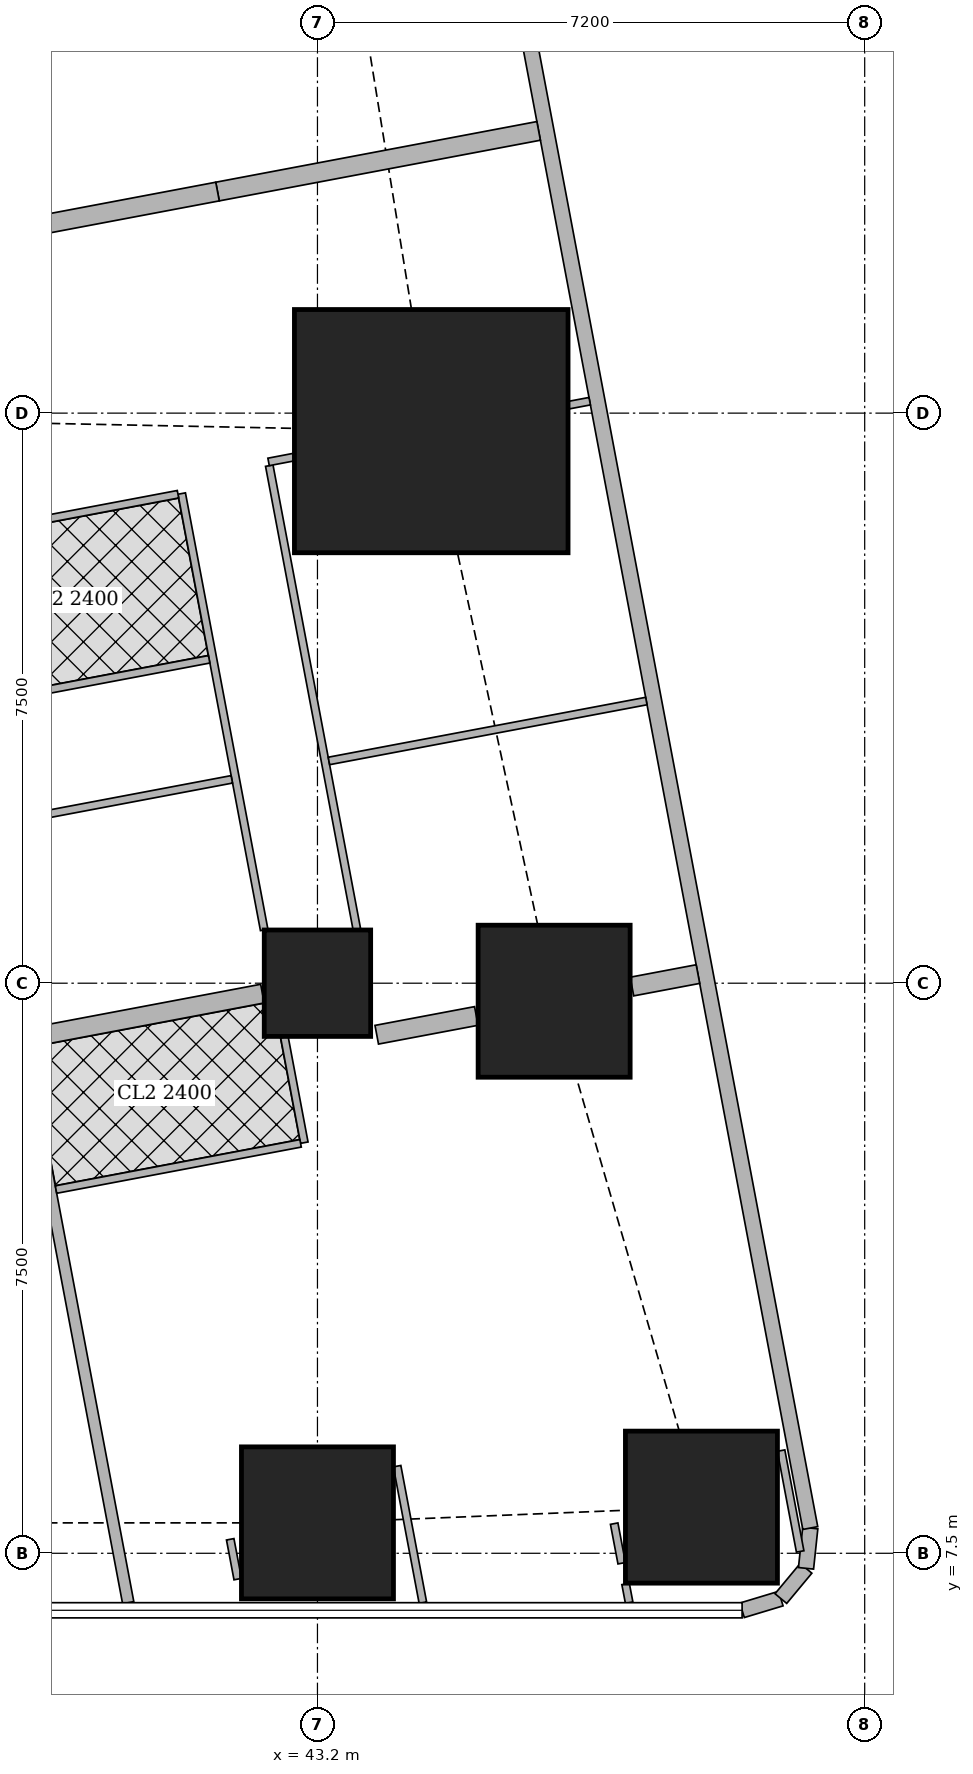
"""IFC4 building model, lengths in metres.
Left out: names, types, materials, properties, quantities, classifications, styles, units other than length and angle.
Written with IfcOpenShell. Run it as: python <this file> out.ifc"""

import sys

from ifc_helpers import new_model, si_unit, direction, frame, frame_2d, origin, origin_2d, place, context, subcontext, project, spatial, rectangle, extrude, element, fill, save


model = new_model("IFC4")
c1 = context("Model", 3, precision=1e-05, world=origin(), true_north=direction((0.0, 1.0)))
c2 = subcontext(c1, "Body", "Model", "MODEL_VIEW")
j1 = project(units=[si_unit("LENGTHUNIT", "METRE"), si_unit("PLANEANGLEUNIT", "RADIAN")], contexts=[c1])
p1 = place(None, origin())
s1 = spatial("IfcSite", under=j1, at=p1, CompositionType="ELEMENT")
p2 = place(p1, origin())
s2 = spatial("IfcBuilding", under=s1, at=p2, CompositionType="ELEMENT")
p3 = place(p2, frame((0.0, 0.0, 262.85)))
s3 = spatial("IfcBuildingStorey", under=s2, at=p3, CompositionType="ELEMENT", Elevation=262.85)
for number, where, z_axis, x_axis in (
    (1, (43.2, 7.9, 0.0), (0.0, 0.0, 1.0), (1.0, 0.0, 0.0)),
    (2, (48.252, 8.107, 0.0), (0.0, 0.0, 1.0), (1.0, 0.0, 0.0)),
):
    element("IfcColumn", number, at=place(p3, frame(where, z_axis=z_axis, x_axis=x_axis)), inside=s3, PredefinedType="COLUMN", context=c2, shape_type="SweptSolid", body=[
        extrude(rectangle(XDim=2.0, YDim=2.0, at=origin_2d()), origin(), (0.0, 0.0, 1.0), 3.75),
    ])
p4 = place(p3, frame((43.2, 15.0, 0.0), z_axis=(0.0, 0.0, 1.0), x_axis=(1.0, 0.0, 0.0)))
e3 = element("IfcColumn", 3, at=p4, inside=s3, PredefinedType="COLUMN", context=c2, shape_type="SweptSolid", body=[
    extrude(rectangle(XDim=1.4, YDim=1.4, at=origin_2d()), origin(), (0.0, 0.0, 1.0), 3.75),
])
p5 = place(p3, frame((46.314, 14.763, 0.0), z_axis=(0.0, 0.0, 1.0), x_axis=(1.0, 0.0, 0.0)))
e4 = element("IfcColumn", 4, at=p5, inside=s3, PredefinedType="COLUMN", context=c2, shape_type="SweptSolid", body=[
    extrude(rectangle(XDim=2.0, YDim=2.0, at=origin_2d()), origin(), (0.0, 0.0, 1.0), 3.75),
])
p6 = place(p3, frame((44.697, 22.263, 0.0), z_axis=(0.0, 0.0, 1.0), x_axis=(1.0, 0.0, 0.0)))
e5 = element("IfcColumn", 5, at=p6, inside=s3, PredefinedType="COLUMN", context=c2, shape_type="SweptSolid", body=[
    extrude(rectangle(XDim=3.6, YDim=3.2, at=origin_2d()), origin(), (0.0, 0.0, 1.0), 3.75),
])
p7 = place(p3, frame((48.787, 6.75, 0.0), z_axis=(0.0, 0.0, 1.0), x_axis=(0.957282247819, 0.289155145225, 0.0)))
e6 = element("IfcWall", 6, at=p7, inside=s3, PredefinedType="SOLIDWALL", context=c2, shape_type="SweptSolid", body=[
    extrude(rectangle(XDim=0.533, YDim=0.2, at=frame_2d((0.266, 0.0))), origin(), (0.0, 0.0, 1.0), 3.5),
])
p8 = place(p3, frame((49.297, 6.904, 0.0), z_axis=(0.0, 0.0, 1.0), x_axis=(0.639255849474, 0.768994121508, 0.0)))
e7 = element("IfcWall", 7, at=p8, inside=s3, PredefinedType="SOLIDWALL", context=c2, shape_type="SweptSolid", body=[
    extrude(rectangle(XDim=0.518, YDim=0.2, at=frame_2d((0.259, 0.0))), origin(), (0.0, 0.0, 1.0), 3.5),
])
p9 = place(p3, frame((49.628, 7.302, 0.0), z_axis=(0.0, 0.0, 1.0), x_axis=(0.105352390132, 0.994434952068, 0.0)))
e8 = element("IfcWall", 8, at=p9, inside=s3, PredefinedType="SOLIDWALL", context=c2, shape_type="SweptSolid", body=[
    extrude(rectangle(XDim=0.533, YDim=0.2, at=frame_2d((0.267, 0.0))), origin(), (0.0, 0.0, 1.0), 3.5),
])
p10 = place(p3, frame((49.684, 7.832, 0.0), z_axis=(0.0, 0.0, 1.0), x_axis=(-0.185616669694, 0.982622232565, 0.0)))
e9 = element("IfcWall", 9, at=p10, inside=s3, PredefinedType="SOLIDWALL", context=c2, shape_type="SweptSolid", body=[
    extrude(rectangle(XDim=36.0, YDim=0.2, at=frame_2d((18.0, 0.0))), origin(), (0.0, 0.0, 1.0), 3.5),
])
p11 = place(p10, frame((2.518, 0.0, 0.9)))
e10 = element("IfcOpeningElement", 10, at=p11, cuts=e9, PredefinedType="OPENING", context=c2, shape_type="SweptSolid", body=[
    extrude(rectangle(XDim=2.4, YDim=1.5, at=frame_2d((1.2, 0.75))), frame((0.0, 0.11, 0.0), z_axis=(0.0, -1.0, 0.0), x_axis=(1.0, 0.0, 0.0)), (0.0, 0.0, 1.0), 0.22),
])
p12 = place(p10, frame((8.444, 0.0, 0.9)))
e11 = element("IfcOpeningElement", 11, at=p12, cuts=e9, PredefinedType="OPENING", context=c2, shape_type="SweptSolid", body=[
    extrude(rectangle(XDim=1.8, YDim=1.5, at=frame_2d((0.9, 0.75))), frame((0.0, 0.11, 0.0), z_axis=(0.0, -1.0, 0.0), x_axis=(1.0, 0.0, 0.0)), (0.0, 0.0, 1.0), 0.22),
])
p13 = place(p10, frame((12.261, 0.0, 0.9)))
e12 = element("IfcOpeningElement", 12, at=p13, cuts=e9, PredefinedType="OPENING", context=c2, shape_type="SweptSolid", body=[
    extrude(rectangle(XDim=1.8, YDim=1.5, at=frame_2d((0.9, 0.75))), frame((0.0, 0.11, 0.0), z_axis=(0.0, -1.0, 0.0), x_axis=(1.0, 0.0, 0.0)), (0.0, 0.0, 1.0), 0.22),
])
p14 = place(p10, frame((16.078, 0.0, 0.9)))
e13 = element("IfcOpeningElement", 13, at=p14, cuts=e9, PredefinedType="OPENING", context=c2, shape_type="SweptSolid", body=[
    extrude(rectangle(XDim=1.8, YDim=1.5, at=frame_2d((0.9, 0.75))), frame((0.0, 0.11, 0.0), z_axis=(0.0, -1.0, 0.0), x_axis=(1.0, 0.0, 0.0)), (0.0, 0.0, 1.0), 0.22),
])
p15 = place(p10, frame((19.894, 0.0, 0.9)))
e14 = element("IfcOpeningElement", 14, at=p15, cuts=e9, PredefinedType="OPENING", context=c2, shape_type="SweptSolid", body=[
    extrude(rectangle(XDim=1.8, YDim=1.5, at=frame_2d((0.9, 0.75))), frame((0.0, 0.11, 0.0), z_axis=(0.0, -1.0, 0.0), x_axis=(1.0, 0.0, 0.0)), (0.0, 0.0, 1.0), 0.22),
])
p16 = place(p10, frame((23.71, 0.0, 0.9)))
e15 = element("IfcOpeningElement", 15, at=p16, cuts=e9, PredefinedType="OPENING", context=c2, shape_type="SweptSolid", body=[
    extrude(rectangle(XDim=1.8, YDim=1.5, at=frame_2d((0.9, 0.75))), frame((0.0, 0.11, 0.0), z_axis=(0.0, -1.0, 0.0), x_axis=(1.0, 0.0, 0.0)), (0.0, 0.0, 1.0), 0.22),
])
p17 = place(p10, frame((27.526, 0.0, 0.9)))
e16 = element("IfcOpeningElement", 16, at=p17, cuts=e9, PredefinedType="OPENING", context=c2, shape_type="SweptSolid", body=[
    extrude(rectangle(XDim=1.8, YDim=1.5, at=frame_2d((0.9, 0.75))), frame((0.0, 0.11, 0.0), z_axis=(0.0, -1.0, 0.0), x_axis=(1.0, 0.0, 0.0)), (0.0, 0.0, 1.0), 0.22),
])
p18 = place(p10, frame((32.046, 0.0, 0.9)))
e17 = element("IfcOpeningElement", 17, at=p18, cuts=e9, PredefinedType="OPENING", context=c2, shape_type="SweptSolid", body=[
    extrude(rectangle(XDim=1.8, YDim=1.5, at=frame_2d((0.9, 0.75))), frame((0.0, 0.11, 0.0), z_axis=(0.0, -1.0, 0.0), x_axis=(1.0, 0.0, 0.0)), (0.0, 0.0, 1.0), 0.22),
])
p19 = place(p3, frame((34.036, 42.186, 0.0), z_axis=(0.0, 0.0, 1.0), x_axis=(0.185593518645, -0.9826266055, 0.0)))
e18 = element("IfcWall", 18, at=p19, inside=s3, PredefinedType="SOLIDWALL", context=c2, shape_type="SweptSolid", body=[
    extrude(rectangle(XDim=35.961, YDim=0.15, at=frame_2d((17.98, 0.0))), origin(), (0.0, 0.0, 1.0), 2.5),
])
p20 = place(p19, frame((15.529, 0.0, 0.0)))
e19 = element("IfcOpeningElement", 19, at=p20, cuts=e18, PredefinedType="OPENING", context=c2, shape_type="SweptSolid", body=[
    extrude(rectangle(XDim=1.0, YDim=2.1, at=frame_2d((0.5, 1.05))), frame((0.0, 0.085, 0.0), z_axis=(0.0, -1.0, 0.0), x_axis=(1.0, 0.0, 0.0)), (0.0, 0.0, 1.0), 0.17),
])
p21 = place(p19, frame((19.345, 0.0, 0.0)))
e20 = element("IfcOpeningElement", 20, at=p21, cuts=e18, PredefinedType="OPENING", context=c2, shape_type="SweptSolid", body=[
    extrude(rectangle(XDim=1.0, YDim=2.1, at=frame_2d((0.5, 1.05))), frame((0.0, 0.085, 0.0), z_axis=(0.0, -1.0, 0.0), x_axis=(1.0, 0.0, 0.0)), (0.0, 0.0, 1.0), 0.17),
])
p22 = place(p19, frame((30.594, 0.0, 0.0)))
e21 = element("IfcOpeningElement", 21, at=p22, cuts=e18, PredefinedType="OPENING", context=c2, shape_type="SweptSolid", body=[
    extrude(rectangle(XDim=1.0, YDim=2.1, at=frame_2d((0.5, 1.05))), frame((0.0, 0.085, 0.0), z_axis=(0.0, -1.0, 0.0), x_axis=(1.0, 0.0, 0.0)), (0.0, 0.0, 1.0), 0.17),
])
p23 = place(p3, frame((44.248, 8.646, 0.0), z_axis=(0.0, 0.0, 1.0), x_axis=(0.185417594585, -0.982659816833, 0.0)))
e22 = element("IfcWall", 22, at=p23, inside=s3, PredefinedType="PARTITIONING", context=c2, shape_type="SweptSolid", body=[
    extrude(rectangle(XDim=1.828, YDim=0.1, at=frame_2d((0.914, 0.0))), origin(), (0.0, 0.0, 1.0), 2.05),
])
p24 = place(p3, frame((42.151, 7.16, 0.0), z_axis=(0.0, 0.0, 1.0), x_axis=(-0.185366164644, 0.982669519729, 0.0)))
e23 = element("IfcWall", 23, at=p24, inside=s3, PredefinedType="PARTITIONING", context=c2, shape_type="SweptSolid", body=[
    extrude(rectangle(XDim=0.533, YDim=0.1, at=frame_2d((0.267, 0.0))), origin(), (0.0, 0.0, 1.0), 2.5),
])
p25 = place(p3, frame((49.3, 8.851, 0.0), z_axis=(0.0, 0.0, 1.0), x_axis=(0.18581620423, -0.982584519645, 0.0)))
e24 = element("IfcWall", 24, at=p25, inside=s3, PredefinedType="PARTITIONING", context=c2, shape_type="SweptSolid", body=[
    extrude(rectangle(XDim=1.351, YDim=0.1, at=frame_2d((0.675, 0.0))), origin(), (0.0, 0.0, 1.0), 3.5),
])
p26 = place(p3, frame((47.301, 6.85, 0.0), z_axis=(0.0, 0.0, 1.0), x_axis=(-0.187513903188, 0.982261948826, 0.0)))
e25 = element("IfcWall", 25, at=p26, inside=s3, PredefinedType="PARTITIONING", context=c2, shape_type="SweptSolid", body=[
    extrude(rectangle(XDim=0.251, YDim=0.1, at=frame_2d((0.125, 0.0))), origin(), (0.0, 0.0, 1.0), 3.5),
])
p27 = place(p3, frame((47.203, 7.369, 0.0), z_axis=(0.0, 0.0, 1.0), x_axis=(-0.186456243114, 0.982463266185, 0.0)))
e26 = element("IfcWall", 26, at=p27, inside=s3, PredefinedType="PARTITIONING", context=c2, shape_type="SweptSolid", body=[
    extrude(rectangle(XDim=0.53, YDim=0.1, at=frame_2d((0.265, 0.0))), origin(), (0.0, 0.0, 1.0), 2.05),
])
p28 = place(p3, frame((42.566, 21.809, 0.0), z_axis=(0.0, 0.0, 1.0), x_axis=(0.185613526435, -0.98262282632, 0.0)))
e27 = element("IfcWall", 27, at=p28, inside=s3, PredefinedType="PARTITIONING", context=c2, shape_type="SweptSolid", body=[
    extrude(rectangle(XDim=6.207, YDim=0.1, at=frame_2d((3.104, 0.0))), origin(), (0.0, 0.0, 1.0), 2.5),
])
p29 = place(p28, frame((1.45, 0.0, 0.0)))
e28 = element("IfcOpeningElement", 28, at=p29, cuts=e27, PredefinedType="OPENING", context=c2, shape_type="SweptSolid", body=[
    extrude(rectangle(XDim=0.9, YDim=2.1, at=frame_2d((0.45, 1.05))), frame((0.0, 0.06, 0.0), z_axis=(0.0, -1.0, 0.0), x_axis=(1.0, 0.0, 0.0)), (0.0, 0.0, 1.0), 0.12),
])
p30 = place(p28, frame((4.163, 0.0, 0.0)))
e29 = element("IfcOpeningElement", 29, at=p30, cuts=e27, PredefinedType="OPENING", context=c2, shape_type="SweptSolid", body=[
    extrude(rectangle(XDim=0.9, YDim=2.1, at=frame_2d((0.45, 1.05))), frame((0.0, 0.06, 0.0), z_axis=(0.0, -1.0, 0.0), x_axis=(1.0, 0.0, 0.0)), (0.0, 0.0, 1.0), 0.12),
])
p31 = place(p3, frame((41.414, 21.442, 0.0), z_axis=(0.0, 0.0, 1.0), x_axis=(0.185698675093, -0.982606738257, 0.0)))
e30 = element("IfcWall", 30, at=p31, inside=s3, PredefinedType="PARTITIONING", context=c2, shape_type="SweptSolid", body=[
    extrude(rectangle(XDim=5.843, YDim=0.1, at=frame_2d((2.921, 0.0))), origin(), (0.0, 0.0, 1.0), 3.5),
])
p32 = place(p31, frame((0.655, 0.0, 0.0)))
e31 = element("IfcOpeningElement", 31, at=p32, cuts=e30, PredefinedType="OPENING", context=c2, shape_type="SweptSolid", body=[
    extrude(rectangle(XDim=0.9, YDim=2.1, at=frame_2d((0.45, 1.05))), frame((0.0, 0.06, 0.0), z_axis=(0.0, -1.0, 0.0), x_axis=(1.0, 0.0, 0.0)), (0.0, 0.0, 1.0), 0.12),
])
p33 = place(p31, frame((2.563, 0.0, 0.0)))
e32 = element("IfcOpeningElement", 32, at=p33, cuts=e30, PredefinedType="OPENING", context=c2, shape_type="SweptSolid", body=[
    extrude(rectangle(XDim=0.9, YDim=2.1, at=frame_2d((0.45, 1.05))), frame((0.0, 0.06, 0.0), z_axis=(0.0, -1.0, 0.0), x_axis=(1.0, 0.0, 0.0)), (0.0, 0.0, 1.0), 0.12),
])
p34 = place(p3, frame((46.782, 22.657, 0.0), z_axis=(0.0, 0.0, 1.0), x_axis=(-0.982574553168, -0.185868898601, 0.0)))
e33 = element("IfcWall", 33, at=p34, inside=s3, PredefinedType="PARTITIONING", context=c2, shape_type="SweptSolid", body=[
    extrude(rectangle(XDim=0.28, YDim=0.1, at=frame_2d((0.14, 0.0))), origin(), (0.0, 0.0, 1.0), 3.5),
])
p35 = place(p3, frame((42.887, 21.921, 0.0), z_axis=(0.0, 0.0, 1.0), x_axis=(-0.982274918032, -0.187445953293, 0.0)))
e34 = element("IfcWall", 34, at=p35, inside=s3, PredefinedType="PARTITIONING", context=c2, shape_type="SweptSolid", body=[
    extrude(rectangle(XDim=0.336, YDim=0.1, at=frame_2d((0.168, 0.0))), origin(), (0.0, 0.0, 1.0), 2.5),
])
p36 = place(p3, frame((47.527, 18.712, 0.0), z_axis=(0.0, 0.0, 1.0), x_axis=(-0.982665405803, -0.185387972203, 0.0)))
e35 = element("IfcWall", 35, at=p36, inside=s3, PredefinedType="PARTITIONING", context=c2, shape_type="SweptSolid", body=[
    extrude(rectangle(XDim=4.25, YDim=0.1, at=frame_2d((2.125, 0.0))), origin(), (0.0, 0.0, 1.0), 2.5),
])
p37 = place(p3, frame((41.365, 21.433, 0.0), z_axis=(0.0, 0.0, 1.0), x_axis=(-0.982607026909, -0.185697147715, 0.0)))
e36 = element("IfcWall", 36, at=p37, inside=s3, PredefinedType="PARTITIONING", context=c2, shape_type="SweptSolid", body=[
    extrude(rectangle(XDim=3.275, YDim=0.1, at=frame_2d((1.637, 0.0))), origin(), (0.0, 0.0, 1.0), 3.5),
])
p38 = place(p3, frame((42.073, 17.682, 0.0), z_axis=(0.0, 0.0, 1.0), x_axis=(-0.982620626894, -0.185625169636, 0.0)))
e37 = element("IfcWall", 37, at=p38, inside=s3, PredefinedType="PARTITIONING", context=c2, shape_type="SweptSolid", body=[
    extrude(rectangle(XDim=3.275, YDim=0.1, at=frame_2d((1.637, 0.0))), origin(), (0.0, 0.0, 1.0), 3.5),
])
p39 = place(p38, frame((1.2, 0.0, 0.0)))
e38 = element("IfcOpeningElement", 38, at=p39, cuts=e37, PredefinedType="OPENING", context=c2, shape_type="SweptSolid", body=[
    extrude(rectangle(XDim=0.9, YDim=2.1, at=frame_2d((0.45, 1.05))), frame((0.0, 0.06, 0.0), z_axis=(0.0, -1.0, 0.0), x_axis=(1.0, 0.0, 0.0)), (0.0, 0.0, 1.0), 0.12),
])
p40 = place(p3, frame((41.775, 19.261, 0.0), z_axis=(0.0, 0.0, 1.0), x_axis=(-0.982620626894, -0.185625169636, 0.0)))
e39 = element("IfcWall", 39, at=p40, inside=s3, PredefinedType="PARTITIONING", context=c2, shape_type="SweptSolid", body=[
    extrude(rectangle(XDim=3.275, YDim=0.1, at=frame_2d((1.637, 0.0))), origin(), (0.0, 0.0, 1.0), 3.5),
])
p41 = place(p3, frame((46.11, 26.213, 0.0), z_axis=(0.0, 0.0, 1.0), x_axis=(-0.982633535512, -0.185556823879, 0.0)))
e40 = element("IfcWall", 40, at=p41, inside=s3, PredefinedType="SOLIDWALL", context=c2, shape_type="SweptSolid", body=[
    extrude(rectangle(XDim=4.3, YDim=0.25, at=frame_2d((2.15, 0.0))), origin(), (0.0, 0.0, 1.0), 2.5),
])
p42 = place(p3, frame((41.885, 25.415, 0.0), z_axis=(0.0, 0.0, 1.0), x_axis=(-0.982612837616, -0.185666398014, 0.0)))
e41 = element("IfcWall", 41, at=p42, inside=s3, PredefinedType="SOLIDWALL", context=c2, shape_type="SweptSolid", body=[
    extrude(rectangle(XDim=4.525, YDim=0.25, at=frame_2d((2.262, 0.0))), origin(), (0.0, 0.0, 1.0), 3.5),
])
p43 = place(p3, frame((42.765, 14.29, 0.0), z_axis=(0.0, 0.0, 1.0), x_axis=(0.185634589628, -0.982618847333, 0.0)))
e42 = element("IfcWall", 42, at=p43, inside=s3, PredefinedType="PARTITIONING", context=c2, shape_type="SweptSolid", body=[
    extrude(rectangle(XDim=1.413, YDim=0.1, at=frame_2d((0.706, 0.0))), origin(), (0.0, 0.0, 1.0), 3.5),
])
p44 = place(p3, frame((42.978, 12.893, 0.0), z_axis=(0.0, 0.0, 1.0), x_axis=(-0.982607026909, -0.185697147715, 0.0)))
e43 = element("IfcWall", 43, at=p44, inside=s3, PredefinedType="PARTITIONING", context=c2, shape_type="SweptSolid", body=[
    extrude(rectangle(XDim=3.275, YDim=0.1, at=frame_2d((1.637, 0.0))), origin(), (0.0, 0.0, 1.0), 3.5),
])
p45 = place(p44, frame((1.2, 0.0, 0.0)))
e44 = element("IfcOpeningElement", 44, at=p45, cuts=e43, PredefinedType="OPENING", context=c2, shape_type="SweptSolid", body=[
    extrude(rectangle(XDim=0.9, YDim=2.1, at=frame_2d((0.45, 1.05))), frame((0.0, 0.06, 0.0), z_axis=(0.0, -1.0, 0.0), x_axis=(1.0, 0.0, 0.0)), (0.0, 0.0, 1.0), 0.12),
])
p46 = place(p3, frame((48.206, 15.12, 0.0), z_axis=(0.0, 0.0, 1.0), x_axis=(-0.982608419258, -0.185689780017, 0.0)))
e45 = element("IfcWall", 45, at=p46, inside=s3, PredefinedType="SOLIDWALL", context=c2, shape_type="SweptSolid", body=[
    extrude(rectangle(XDim=0.884, YDim=0.25, at=frame_2d((0.442, 0.0))), origin(), (0.0, 0.0, 1.0), 3.5),
])
p47 = place(p3, frame((45.29, 14.569, 0.0), z_axis=(0.0, 0.0, 1.0), x_axis=(-0.982676759201, -0.185327782391, 0.0)))
e46 = element("IfcWall", 46, at=p47, inside=s3, PredefinedType="SOLIDWALL", context=c2, shape_type="SweptSolid", body=[
    extrude(rectangle(XDim=1.333, YDim=0.25, at=frame_2d((0.667, 0.0))), origin(), (0.0, 0.0, 1.0), 3.5),
])
p48 = place(p3, frame((42.476, 14.863, 0.0), z_axis=(0.0, 0.0, 1.0), x_axis=(-0.982638716117, -0.185529387398, 0.0)))
e47 = element("IfcWall", 47, at=p48, inside=s3, PredefinedType="SOLIDWALL", context=c2, shape_type="SweptSolid", body=[
    extrude(rectangle(XDim=3.148, YDim=0.25, at=frame_2d((1.574, 0.0))), origin(), (0.0, 0.0, 1.0), 3.5),
])
p49 = place(p11, origin())
e48 = element("IfcWindow", 48, at=p49, inside=s3, PartitioningType="SINGLE_PANEL", PredefinedType="WINDOW", context=c2, shape_type="SweptSolid", body=[
    extrude(rectangle(XDim=2.4, YDim=1.5, at=frame_2d((1.2, 0.75))), frame((0.0, 0.03, 0.0), z_axis=(0.0, -1.0, 0.0), x_axis=(1.0, 0.0, 0.0)), (0.0, 0.0, 1.0), 0.06),
])
fill(e10, e48)
p50 = place(p12, origin())
e49 = element("IfcWindow", 49, at=p50, inside=s3, PartitioningType="SINGLE_PANEL", PredefinedType="WINDOW", context=c2, shape_type="SweptSolid", body=[
    extrude(rectangle(XDim=1.8, YDim=1.5, at=frame_2d((0.9, 0.75))), frame((0.0, 0.03, 0.0), z_axis=(0.0, -1.0, 0.0), x_axis=(1.0, 0.0, 0.0)), (0.0, 0.0, 1.0), 0.06),
])
fill(e11, e49)
p51 = place(p13, origin())
e50 = element("IfcWindow", 50, at=p51, inside=s3, PartitioningType="SINGLE_PANEL", PredefinedType="WINDOW", context=c2, shape_type="SweptSolid", body=[
    extrude(rectangle(XDim=1.8, YDim=1.5, at=frame_2d((0.9, 0.75))), frame((0.0, 0.03, 0.0), z_axis=(0.0, -1.0, 0.0), x_axis=(1.0, 0.0, 0.0)), (0.0, 0.0, 1.0), 0.06),
])
fill(e12, e50)
p52 = place(p14, origin())
e51 = element("IfcWindow", 51, at=p52, inside=s3, PartitioningType="SINGLE_PANEL", PredefinedType="WINDOW", context=c2, shape_type="SweptSolid", body=[
    extrude(rectangle(XDim=1.8, YDim=1.5, at=frame_2d((0.9, 0.75))), frame((0.0, 0.03, 0.0), z_axis=(0.0, -1.0, 0.0), x_axis=(1.0, 0.0, 0.0)), (0.0, 0.0, 1.0), 0.06),
])
fill(e13, e51)
p53 = place(p29, origin())
e52 = element("IfcDoor", 52, at=p53, inside=s3, OperationType="SINGLE_SWING_LEFT", PredefinedType="DOOR", context=c2, shape_type="SweptSolid", body=[
    extrude(rectangle(XDim=0.9, YDim=2.1, at=frame_2d((0.45, 1.05))), frame((0.0, 0.025, 0.0), z_axis=(0.0, -1.0, 0.0), x_axis=(1.0, 0.0, 0.0)), (0.0, 0.0, 1.0), 0.05),
])
fill(e28, e52)
p54 = place(p30, origin())
e53 = element("IfcDoor", 53, at=p54, inside=s3, OperationType="SINGLE_SWING_LEFT", PredefinedType="DOOR", context=c2, shape_type="SweptSolid", body=[
    extrude(rectangle(XDim=0.9, YDim=2.1, at=frame_2d((0.45, 1.05))), frame((0.0, 0.025, 0.0), z_axis=(0.0, -1.0, 0.0), x_axis=(1.0, 0.0, 0.0)), (0.0, 0.0, 1.0), 0.05),
])
fill(e29, e53)
p55 = place(p32, origin())
e54 = element("IfcDoor", 54, at=p55, inside=s3, OperationType="SINGLE_SWING_RIGHT", PredefinedType="DOOR", context=c2, shape_type="SweptSolid", body=[
    extrude(rectangle(XDim=0.9, YDim=2.1, at=frame_2d((0.45, 1.05))), frame((0.0, 0.025, 0.0), z_axis=(0.0, -1.0, 0.0), x_axis=(1.0, 0.0, 0.0)), (0.0, 0.0, 1.0), 0.05),
])
fill(e31, e54)
p56 = place(p33, origin())
e55 = element("IfcDoor", 55, at=p56, inside=s3, OperationType="SINGLE_SWING_RIGHT", PredefinedType="DOOR", context=c2, shape_type="SweptSolid", body=[
    extrude(rectangle(XDim=0.9, YDim=2.1, at=frame_2d((0.45, 1.05))), frame((0.0, 0.025, 0.0), z_axis=(0.0, -1.0, 0.0), x_axis=(1.0, 0.0, 0.0)), (0.0, 0.0, 1.0), 0.05),
])
fill(e32, e55)
p57 = place(p45, origin())
e56 = element("IfcDoor", 56, at=p57, inside=s3, OperationType="SINGLE_SWING_RIGHT", PredefinedType="DOOR", context=c2, shape_type="SweptSolid", body=[
    extrude(rectangle(XDim=0.9, YDim=2.1, at=frame_2d((0.45, 1.05))), frame((0.0, 0.025, 0.0), z_axis=(0.0, -1.0, 0.0), x_axis=(1.0, 0.0, 0.0)), (0.0, 0.0, 1.0), 0.05),
])
fill(e44, e56)
p58 = place(p22, origin())
e57 = element("IfcDoor", 57, at=p58, inside=s3, OperationType="SINGLE_SWING_LEFT", PredefinedType="DOOR", context=c2, shape_type="SweptSolid", body=[
    extrude(rectangle(XDim=1.0, YDim=2.1, at=frame_2d((0.5, 1.05))), frame((0.0, 0.025, 0.0), z_axis=(0.0, -1.0, 0.0), x_axis=(1.0, 0.0, 0.0)), (0.0, 0.0, 1.0), 0.05),
])
fill(e21, e57)
p59 = place(p39, origin())
e58 = element("IfcDoor", 58, at=p59, inside=s3, OperationType="SINGLE_SWING_RIGHT", PredefinedType="DOOR", context=c2, shape_type="SweptSolid", body=[
    extrude(rectangle(XDim=0.9, YDim=2.1, at=frame_2d((0.45, 1.05))), frame((0.0, 0.025, 0.0), z_axis=(0.0, -1.0, 0.0), x_axis=(1.0, 0.0, 0.0)), (0.0, 0.0, 1.0), 0.05),
])
fill(e38, e58)
save(model, sys.argv[1])
